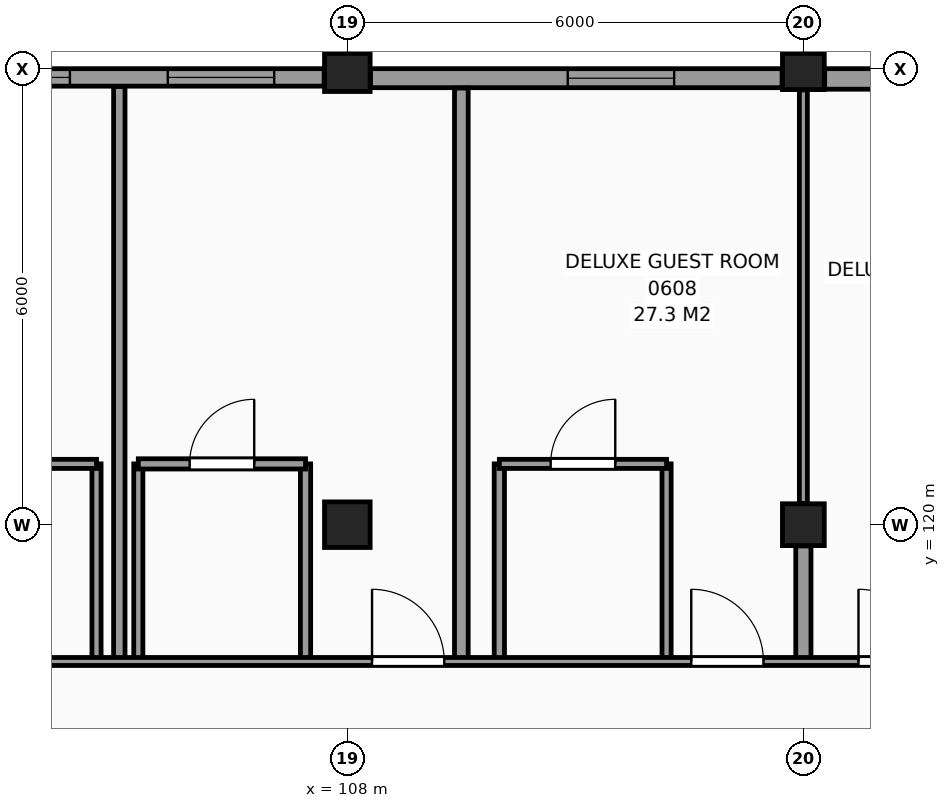
"""IFC4 building model, lengths in metres.
Left out: names, types, materials, properties, quantities, classifications, styles, units other than length and angle.
Written with IfcOpenShell. Run it as: python <this file> out.ifc"""

import sys

from ifc_helpers import new_model, si_unit, direction, frame, frame_2d, origin, origin_2d, place, context, subcontext, project, spatial, rectangle, extrude, element, fill, save


model = new_model("IFC4")
c1 = context("Model", 3, precision=1e-05, world=origin(), true_north=direction((0.0, 1.0)))
c2 = subcontext(c1, "Body", "Model", "MODEL_VIEW")
j1 = project(units=[si_unit("LENGTHUNIT", "METRE"), si_unit("PLANEANGLEUNIT", "RADIAN")], contexts=[c1])
p1 = place(None, origin())
s1 = spatial("IfcSite", under=j1, at=p1, CompositionType="ELEMENT")
p2 = place(p1, origin())
s2 = spatial("IfcBuilding", under=s1, at=p2, CompositionType="ELEMENT")
p3 = place(p2, frame((0.0, 0.0, 28.2)))
s3 = spatial("IfcBuildingStorey", under=s2, at=p3, CompositionType="ELEMENT", Elevation=28.2)
for number, where, z_axis, x_axis in (
    (1, (108.0, 120.0, 0.0), (0.0, 0.0, 1.0), (1.0, 0.0, 0.0)),
    (2, (108.0, 126.0, 0.0), (0.0, 0.0, 1.0), (1.0, 0.0, 0.0)),
):
    element("IfcColumn", number, at=place(p3, frame(where, z_axis=z_axis, x_axis=x_axis)), inside=s3, PredefinedType="COLUMN", context=c2, shape_type="SweptSolid", body=[
        extrude(rectangle(XDim=0.6, YDim=0.6, at=origin_2d()), origin(), (0.0, 0.0, 1.0), 3.3),
    ])
for number, where, z_axis, x_axis in (
    (3, (114.0, 120.0, 0.0), (0.0, 0.0, 1.0), (1.0, 0.0, 0.0)),
    (4, (114.0, 126.0, 0.0), (0.0, 0.0, 1.0), (1.0, 0.0, 0.0)),
):
    element("IfcColumn", number, at=place(p3, frame(where, z_axis=z_axis, x_axis=x_axis)), inside=s3, PredefinedType="COLUMN", context=c2, shape_type="SweptSolid", body=[
        extrude(rectangle(XDim=0.55, YDim=0.55, at=origin_2d()), origin(), (0.0, 0.0, 1.0), 3.3),
    ])
p4 = place(p3, frame((119.695, 125.865, 0.0), z_axis=(0.0, 0.0, 1.0), x_axis=(-1.0, 0.0, 0.0)))
e5 = element("IfcWall", 5, at=p4, inside=s3, PredefinedType="SOLIDWALL", context=c2, shape_type="SweptSolid", body=[
    extrude(rectangle(XDim=5.415, YDim=0.27, at=frame_2d((2.708, 0.0))), origin(), (0.0, 0.0, 1.0), 2.43),
])
p5 = place(p4, frame((2.595, 0.0, 0.8)))
e6 = element("IfcOpeningElement", 6, at=p5, cuts=e5, PredefinedType="OPENING", context=c2, shape_type="SweptSolid", body=[
    extrude(rectangle(XDim=1.4, YDim=1.4, at=frame_2d((0.7, 0.7))), frame((0.0, 0.145, 0.0), z_axis=(0.0, -1.0, 0.0), x_axis=(1.0, 0.0, 0.0)), (0.0, 0.0, 1.0), 0.29),
])
p6 = place(p3, frame((113.72, 125.875, 0.0), z_axis=(0.0, 0.0, 1.0), x_axis=(-1.0, 0.0, 0.0)))
e7 = element("IfcWall", 7, at=p6, inside=s3, PredefinedType="SOLIDWALL", context=c2, shape_type="SweptSolid", body=[
    extrude(rectangle(XDim=5.415, YDim=0.25, at=frame_2d((2.708, 0.0))), origin(), (0.0, 0.0, 1.0), 2.43),
])
p7 = place(p6, frame((1.42, 0.0, 0.8)))
e8 = element("IfcOpeningElement", 8, at=p7, cuts=e7, PredefinedType="OPENING", context=c2, shape_type="SweptSolid", body=[
    extrude(rectangle(XDim=1.4, YDim=1.4, at=frame_2d((0.7, 0.7))), frame((0.0, 0.135, 0.0), z_axis=(0.0, -1.0, 0.0), x_axis=(1.0, 0.0, 0.0)), (0.0, 0.0, 1.0), 0.27),
])
p8 = place(p3, frame((107.695, 125.885, 0.0), z_axis=(0.0, 0.0, 1.0), x_axis=(-1.0, 0.0, 0.0)))
e9 = element("IfcWall", 9, at=p8, inside=s3, PredefinedType="SOLIDWALL", context=c2, shape_type="SweptSolid", body=[
    extrude(rectangle(XDim=5.415, YDim=0.23, at=frame_2d((2.708, 0.0))), origin(), (0.0, 0.0, 1.0), 2.43),
])
p9 = place(p8, frame((3.345, 0.0, 0.8)))
e10 = element("IfcOpeningElement", 10, at=p9, cuts=e9, PredefinedType="OPENING", context=c2, shape_type="SweptSolid", body=[
    extrude(rectangle(XDim=1.4, YDim=1.4, at=frame_2d((0.7, 0.7))), frame((0.0, 0.125, 0.0), z_axis=(0.0, -1.0, 0.0), x_axis=(1.0, 0.0, 0.0)), (0.0, 0.0, 1.0), 0.25),
])
p10 = place(p8, frame((0.657, 0.0, 0.8)))
e11 = element("IfcOpeningElement", 11, at=p10, cuts=e9, PredefinedType="OPENING", context=c2, shape_type="SweptSolid", body=[
    extrude(rectangle(XDim=1.4, YDim=1.4, at=frame_2d((0.7, 0.7))), frame((0.0, 0.125, 0.0), z_axis=(0.0, -1.0, 0.0), x_axis=(1.0, 0.0, 0.0)), (0.0, 0.0, 1.0), 0.25),
])
p11 = place(p3, frame((104.7, 118.2, 0.0), z_axis=(0.0, 0.0, 1.0), x_axis=(0.0, 1.0, 0.0)))
e12 = element("IfcWall", 12, at=p11, inside=s3, PredefinedType="PARTITIONING", context=c2, shape_type="SweptSolid", body=[
    extrude(rectangle(XDim=2.6, YDim=0.12, at=frame_2d((1.3, 0.0))), origin(), (0.0, 0.0, 1.0), 3.08),
])
p12 = place(p3, frame((105.0, 118.2, 0.0), z_axis=(0.0, 0.0, 1.0), x_axis=(0.0, 1.0, 0.0)))
e13 = element("IfcWall", 13, at=p12, inside=s3, PredefinedType="PARTITIONING", context=c2, shape_type="SweptSolid", body=[
    extrude(rectangle(XDim=7.565, YDim=0.15, at=frame_2d((3.782, 0.0))), origin(), (0.0, 0.0, 1.0), 3.08),
])
p13 = place(p3, frame((105.25, 118.2, 0.0), z_axis=(0.0, 0.0, 1.0), x_axis=(0.0, 1.0, 0.0)))
e14 = element("IfcWall", 14, at=p13, inside=s3, PredefinedType="PARTITIONING", context=c2, shape_type="SweptSolid", body=[
    extrude(rectangle(XDim=2.6, YDim=0.12, at=frame_2d((1.3, 0.0))), origin(), (0.0, 0.0, 1.0), 3.08),
])
p14 = place(p3, frame((107.45, 118.2, 0.0), z_axis=(0.0, 0.0, 1.0), x_axis=(0.0, 1.0, 0.0)))
e15 = element("IfcWall", 15, at=p14, inside=s3, PredefinedType="PARTITIONING", context=c2, shape_type="SweptSolid", body=[
    extrude(rectangle(XDim=2.6, YDim=0.135, at=frame_2d((1.3, 0.0))), origin(), (0.0, 0.0, 1.0), 3.08),
])
p15 = place(p3, frame((109.5, 118.2, 0.0), z_axis=(0.0, 0.0, 1.0), x_axis=(0.0, 1.0, 0.0)))
e16 = element("IfcWall", 16, at=p15, inside=s3, PredefinedType="PARTITIONING", context=c2, shape_type="SweptSolid", body=[
    extrude(rectangle(XDim=7.545, YDim=0.18, at=frame_2d((3.772, 0.0))), origin(), (0.0, 0.0, 1.0), 3.08),
])
p16 = place(p3, frame((110.0, 118.2, 0.0), z_axis=(0.0, 0.0, 1.0), x_axis=(0.0, 1.0, 0.0)))
e17 = element("IfcWall", 17, at=p16, inside=s3, PredefinedType="PARTITIONING", context=c2, shape_type="SweptSolid", body=[
    extrude(rectangle(XDim=2.6, YDim=0.135, at=frame_2d((1.3, 0.0))), origin(), (0.0, 0.0, 1.0), 3.08),
])
p17 = place(p3, frame((112.2, 118.2, 0.0), z_axis=(0.0, 0.0, 1.0), x_axis=(0.0, 1.0, 0.0)))
e18 = element("IfcWall", 18, at=p17, inside=s3, PredefinedType="PARTITIONING", context=c2, shape_type="SweptSolid", body=[
    extrude(rectangle(XDim=2.6, YDim=0.12, at=frame_2d((1.3, 0.0))), origin(), (0.0, 0.0, 1.0), 3.08),
])
p18 = place(p3, frame((114.0, 118.2, 0.0), z_axis=(0.0, 0.0, 1.0), x_axis=(0.0, 1.0, 0.0)))
e19 = element("IfcWall", 19, at=p18, inside=s3, PredefinedType="PARTITIONING", context=c2, shape_type="SweptSolid", body=[
    extrude(rectangle(XDim=1.52, YDim=0.2, at=frame_2d((0.76, 0.0))), origin(), (0.0, 0.0, 1.0), 2.38),
])
p19 = place(p3, frame((114.0, 120.28, 0.0), z_axis=(0.0, 0.0, 1.0), x_axis=(0.0, 1.0, 0.0)))
e20 = element("IfcWall", 20, at=p19, inside=s3, PredefinedType="PARTITIONING", context=c2, shape_type="SweptSolid", body=[
    extrude(rectangle(XDim=5.44, YDim=0.105, at=frame_2d((2.72, 0.0))), origin(), (0.0, 0.0, 1.0), 2.53),
])
p20 = place(p3, frame((66.235, 118.2, 0.0), z_axis=(0.0, 0.0, 1.0), x_axis=(1.0, 0.0, 0.0)))
e21 = element("IfcWall", 21, at=p20, inside=s3, PredefinedType="PARTITIONING", context=c2, shape_type="SweptSolid", body=[
    extrude(rectangle(XDim=110.265, YDim=0.105, at=frame_2d((55.132, 0.0))), origin(), (0.0, 0.0, 1.0), 3.08),
])
p21 = place(p20, frame((0.49, 0.0, 0.0)))
e22 = element("IfcOpeningElement", 22, at=p21, cuts=e21, PredefinedType="OPENING", context=c2, shape_type="SweptSolid", body=[
    extrude(rectangle(XDim=0.95, YDim=2.1, at=frame_2d((0.475, 1.05))), frame((0.0, 0.062, 0.0), z_axis=(0.0, -1.0, 0.0), x_axis=(1.0, 0.0, 0.0)), (0.0, 0.0, 1.0), 0.125),
])
p22 = place(p20, frame((4.89, 0.0, 0.0)))
e23 = element("IfcOpeningElement", 23, at=p22, cuts=e21, PredefinedType="OPENING", context=c2, shape_type="SweptSolid", body=[
    extrude(rectangle(XDim=0.95, YDim=2.1, at=frame_2d((0.475, 1.05))), frame((0.0, 0.062, 0.0), z_axis=(0.0, -1.0, 0.0), x_axis=(1.0, 0.0, 0.0)), (0.0, 0.0, 1.0), 0.125),
])
p23 = place(p20, frame((9.39, 0.0, 0.0)))
e24 = element("IfcOpeningElement", 24, at=p23, cuts=e21, PredefinedType="OPENING", context=c2, shape_type="SweptSolid", body=[
    extrude(rectangle(XDim=0.95, YDim=2.1, at=frame_2d((0.475, 1.05))), frame((0.0, 0.062, 0.0), z_axis=(0.0, -1.0, 0.0), x_axis=(1.0, 0.0, 0.0)), (0.0, 0.0, 1.0), 0.125),
])
p24 = place(p20, frame((24.09, 0.0, 0.0)))
e25 = element("IfcOpeningElement", 25, at=p24, cuts=e21, PredefinedType="OPENING", context=c2, shape_type="SweptSolid", body=[
    extrude(rectangle(XDim=0.95, YDim=2.1, at=frame_2d((0.475, 1.05))), frame((0.0, 0.062, 0.0), z_axis=(0.0, -1.0, 0.0), x_axis=(1.0, 0.0, 0.0)), (0.0, 0.0, 1.0), 0.125),
])
p25 = place(p20, frame((32.34, 0.0, 0.0)))
e26 = element("IfcOpeningElement", 26, at=p25, cuts=e21, PredefinedType="OPENING", context=c2, shape_type="SweptSolid", body=[
    extrude(rectangle(XDim=0.95, YDim=2.1, at=frame_2d((0.475, 1.05))), frame((0.0, 0.062, 0.0), z_axis=(0.0, -1.0, 0.0), x_axis=(1.0, 0.0, 0.0)), (0.0, 0.0, 1.0), 0.125),
])
p26 = place(p20, frame((34.89, 0.0, 0.0)))
e27 = element("IfcOpeningElement", 27, at=p26, cuts=e21, PredefinedType="OPENING", context=c2, shape_type="SweptSolid", body=[
    extrude(rectangle(XDim=0.95, YDim=2.1, at=frame_2d((0.475, 1.05))), frame((0.0, 0.062, 0.0), z_axis=(0.0, -1.0, 0.0), x_axis=(1.0, 0.0, 0.0)), (0.0, 0.0, 1.0), 0.125),
])
p27 = place(p20, frame((42.09, 0.0, 0.0)))
e28 = element("IfcOpeningElement", 28, at=p27, cuts=e21, PredefinedType="OPENING", context=c2, shape_type="SweptSolid", body=[
    extrude(rectangle(XDim=0.95, YDim=2.1, at=frame_2d((0.475, 1.05))), frame((0.0, 0.062, 0.0), z_axis=(0.0, -1.0, 0.0), x_axis=(1.0, 0.0, 0.0)), (0.0, 0.0, 1.0), 0.125),
])
p28 = place(p20, frame((46.29, 0.0, 0.0)))
e29 = element("IfcOpeningElement", 29, at=p28, cuts=e21, PredefinedType="OPENING", context=c2, shape_type="SweptSolid", body=[
    extrude(rectangle(XDim=0.95, YDim=2.1, at=frame_2d((0.475, 1.05))), frame((0.0, 0.062, 0.0), z_axis=(0.0, -1.0, 0.0), x_axis=(1.0, 0.0, 0.0)), (0.0, 0.0, 1.0), 0.125),
])
p29 = place(p20, frame((48.49, 0.0, 0.0)))
e30 = element("IfcOpeningElement", 30, at=p29, cuts=e21, PredefinedType="OPENING", context=c2, shape_type="SweptSolid", body=[
    extrude(rectangle(XDim=0.95, YDim=2.1, at=frame_2d((0.475, 1.05))), frame((0.0, 0.062, 0.0), z_axis=(0.0, -1.0, 0.0), x_axis=(1.0, 0.0, 0.0)), (0.0, 0.0, 1.0), 0.125),
])
p30 = place(p20, frame((54.49, 0.0, 0.0)))
e31 = element("IfcOpeningElement", 31, at=p30, cuts=e21, PredefinedType="OPENING", context=c2, shape_type="SweptSolid", body=[
    extrude(rectangle(XDim=0.95, YDim=2.1, at=frame_2d((0.475, 1.05))), frame((0.0, 0.062, 0.0), z_axis=(0.0, -1.0, 0.0), x_axis=(1.0, 0.0, 0.0)), (0.0, 0.0, 1.0), 0.125),
])
p31 = place(p20, frame((64.29, 0.0, 0.0)))
e32 = element("IfcOpeningElement", 32, at=p31, cuts=e21, PredefinedType="OPENING", context=c2, shape_type="SweptSolid", body=[
    extrude(rectangle(XDim=0.95, YDim=2.1, at=frame_2d((0.475, 1.05))), frame((0.0, 0.062, 0.0), z_axis=(0.0, -1.0, 0.0), x_axis=(1.0, 0.0, 0.0)), (0.0, 0.0, 1.0), 0.125),
])
p32 = place(p20, frame((66.49, 0.0, 0.0)))
e33 = element("IfcOpeningElement", 33, at=p32, cuts=e21, PredefinedType="OPENING", context=c2, shape_type="SweptSolid", body=[
    extrude(rectangle(XDim=0.95, YDim=2.1, at=frame_2d((0.475, 1.05))), frame((0.0, 0.062, 0.0), z_axis=(0.0, -1.0, 0.0), x_axis=(1.0, 0.0, 0.0)), (0.0, 0.0, 1.0), 0.125),
])
p33 = place(p20, frame((70.89, 0.0, 0.0)))
e34 = element("IfcOpeningElement", 34, at=p33, cuts=e21, PredefinedType="OPENING", context=c2, shape_type="SweptSolid", body=[
    extrude(rectangle(XDim=0.95, YDim=2.1, at=frame_2d((0.475, 1.05))), frame((0.0, 0.062, 0.0), z_axis=(0.0, -1.0, 0.0), x_axis=(1.0, 0.0, 0.0)), (0.0, 0.0, 1.0), 0.125),
])
p34 = place(p20, frame((78.09, 0.0, 0.0)))
e35 = element("IfcOpeningElement", 35, at=p34, cuts=e21, PredefinedType="OPENING", context=c2, shape_type="SweptSolid", body=[
    extrude(rectangle(XDim=0.95, YDim=2.1, at=frame_2d((0.475, 1.05))), frame((0.0, 0.062, 0.0), z_axis=(0.0, -1.0, 0.0), x_axis=(1.0, 0.0, 0.0)), (0.0, 0.0, 1.0), 0.125),
])
p35 = place(p20, frame((86.34, 0.0, 0.0)))
e36 = element("IfcOpeningElement", 36, at=p35, cuts=e21, PredefinedType="OPENING", context=c2, shape_type="SweptSolid", body=[
    extrude(rectangle(XDim=0.95, YDim=2.1, at=frame_2d((0.475, 1.05))), frame((0.0, 0.062, 0.0), z_axis=(0.0, -1.0, 0.0), x_axis=(1.0, 0.0, 0.0)), (0.0, 0.0, 1.0), 0.125),
])
p36 = place(p20, frame((88.89, 0.0, 0.0)))
e37 = element("IfcOpeningElement", 37, at=p36, cuts=e21, PredefinedType="OPENING", context=c2, shape_type="SweptSolid", body=[
    extrude(rectangle(XDim=0.95, YDim=2.1, at=frame_2d((0.475, 1.05))), frame((0.0, 0.062, 0.0), z_axis=(0.0, -1.0, 0.0), x_axis=(1.0, 0.0, 0.0)), (0.0, 0.0, 1.0), 0.125),
])
p37 = place(p20, frame((93.39, 0.0, 0.0)))
e38 = element("IfcOpeningElement", 38, at=p37, cuts=e21, PredefinedType="OPENING", context=c2, shape_type="SweptSolid", body=[
    extrude(rectangle(XDim=0.95, YDim=2.1, at=frame_2d((0.475, 1.05))), frame((0.0, 0.062, 0.0), z_axis=(0.0, -1.0, 0.0), x_axis=(1.0, 0.0, 0.0)), (0.0, 0.0, 1.0), 0.125),
])
p38 = place(p20, frame((104.99, 0.0, 0.0)))
e39 = element("IfcOpeningElement", 39, at=p38, cuts=e21, PredefinedType="OPENING", context=c2, shape_type="SweptSolid", body=[
    extrude(rectangle(XDim=0.95, YDim=2.1, at=frame_2d((0.475, 1.05))), frame((0.0, 0.062, 0.0), z_axis=(0.0, -1.0, 0.0), x_axis=(1.0, 0.0, 0.0)), (0.0, 0.0, 1.0), 0.125),
])
p39 = place(p3, frame((102.5, 120.8, 0.0), z_axis=(0.0, 0.0, 1.0), x_axis=(1.0, 0.0, 0.0)))
e40 = element("IfcWall", 40, at=p39, inside=s3, PredefinedType="PARTITIONING", context=c2, shape_type="SweptSolid", body=[
    extrude(rectangle(XDim=2.2, YDim=0.12, at=frame_2d((1.1, 0.0))), origin(), (0.0, 0.0, 1.0), 3.08),
])
p40 = place(p39, frame((0.675, 0.0, 0.0)))
e41 = element("IfcOpeningElement", 41, at=p40, cuts=e40, PredefinedType="OPENING", context=c2, shape_type="SweptSolid", body=[
    extrude(rectangle(XDim=0.85, YDim=2.1, at=frame_2d((0.425, 1.05))), frame((0.0, 0.07, 0.0), z_axis=(0.0, -1.0, 0.0), x_axis=(1.0, 0.0, 0.0)), (0.0, 0.0, 1.0), 0.14),
])
p41 = place(p3, frame((105.25, 120.8, 0.0), z_axis=(0.0, 0.0, 1.0), x_axis=(1.0, 0.0, 0.0)))
e42 = element("IfcWall", 42, at=p41, inside=s3, PredefinedType="PARTITIONING", context=c2, shape_type="SweptSolid", body=[
    extrude(rectangle(XDim=2.2, YDim=0.135, at=frame_2d((1.1, 0.0))), origin(), (0.0, 0.0, 1.0), 3.08),
])
p42 = place(p41, frame((0.675, 0.0, 0.0)))
e43 = element("IfcOpeningElement", 43, at=p42, cuts=e42, PredefinedType="OPENING", context=c2, shape_type="SweptSolid", body=[
    extrude(rectangle(XDim=0.85, YDim=2.1, at=frame_2d((0.425, 1.05))), frame((0.0, 0.078, 0.0), z_axis=(0.0, -1.0, 0.0), x_axis=(1.0, 0.0, 0.0)), (0.0, 0.0, 1.0), 0.155),
])
p43 = place(p3, frame((110.0, 120.8, 0.0), z_axis=(0.0, 0.0, 1.0), x_axis=(1.0, 0.0, 0.0)))
e44 = element("IfcWall", 44, at=p43, inside=s3, PredefinedType="PARTITIONING", context=c2, shape_type="SweptSolid", body=[
    extrude(rectangle(XDim=2.2, YDim=0.12, at=frame_2d((1.1, 0.0))), origin(), (0.0, 0.0, 1.0), 3.08),
])
p44 = place(p43, frame((0.675, 0.0, 0.0)))
e45 = element("IfcOpeningElement", 45, at=p44, cuts=e44, PredefinedType="OPENING", context=c2, shape_type="SweptSolid", body=[
    extrude(rectangle(XDim=0.85, YDim=2.1, at=frame_2d((0.425, 1.05))), frame((0.0, 0.07, 0.0), z_axis=(0.0, -1.0, 0.0), x_axis=(1.0, 0.0, 0.0)), (0.0, 0.0, 1.0), 0.14),
])
p45 = place(p9, origin())
e46 = element("IfcWindow", 46, at=p45, inside=s3, PartitioningType="SINGLE_PANEL", PredefinedType="WINDOW", context=c2, shape_type="SweptSolid", body=[
    extrude(rectangle(XDim=1.4, YDim=1.4, at=frame_2d((0.7, 0.7))), frame((0.0, 0.03, 0.0), z_axis=(0.0, -1.0, 0.0), x_axis=(1.0, 0.0, 0.0)), (0.0, 0.0, 1.0), 0.06),
])
fill(e10, e46)
p46 = place(p10, origin())
e47 = element("IfcWindow", 47, at=p46, inside=s3, PartitioningType="SINGLE_PANEL", PredefinedType="WINDOW", context=c2, shape_type="SweptSolid", body=[
    extrude(rectangle(XDim=1.4, YDim=1.4, at=frame_2d((0.7, 0.7))), frame((0.0, 0.03, 0.0), z_axis=(0.0, -1.0, 0.0), x_axis=(1.0, 0.0, 0.0)), (0.0, 0.0, 1.0), 0.06),
])
fill(e11, e47)
p47 = place(p7, origin())
e48 = element("IfcWindow", 48, at=p47, inside=s3, PartitioningType="SINGLE_PANEL", PredefinedType="WINDOW", context=c2, shape_type="SweptSolid", body=[
    extrude(rectangle(XDim=1.4, YDim=1.4, at=frame_2d((0.7, 0.7))), frame((0.0, 0.03, 0.0), z_axis=(0.0, -1.0, 0.0), x_axis=(1.0, 0.0, 0.0)), (0.0, 0.0, 1.0), 0.06),
])
fill(e8, e48)
p48 = place(p42, origin())
e49 = element("IfcDoor", 49, at=p48, inside=s3, OperationType="SINGLE_SWING_RIGHT", PredefinedType="DOOR", context=c2, shape_type="SweptSolid", body=[
    extrude(rectangle(XDim=0.85, YDim=2.1, at=frame_2d((0.425, 1.05))), frame((0.0, 0.025, 0.0), z_axis=(0.0, -1.0, 0.0), x_axis=(1.0, 0.0, 0.0)), (0.0, 0.0, 1.0), 0.05),
])
fill(e43, e49)
p49 = place(p27, origin())
e50 = element("IfcDoor", 50, at=p49, inside=s3, OperationType="SINGLE_SWING_LEFT", PredefinedType="DOOR", context=c2, shape_type="SweptSolid", body=[
    extrude(rectangle(XDim=0.95, YDim=2.1, at=frame_2d((0.475, 1.05))), frame((0.0, 0.025, 0.0), z_axis=(0.0, -1.0, 0.0), x_axis=(1.0, 0.0, 0.0)), (0.0, 0.0, 1.0), 0.05),
])
fill(e28, e50)
p50 = place(p44, origin())
e51 = element("IfcDoor", 51, at=p50, inside=s3, OperationType="SINGLE_SWING_RIGHT", PredefinedType="DOOR", context=c2, shape_type="SweptSolid", body=[
    extrude(rectangle(XDim=0.85, YDim=2.1, at=frame_2d((0.425, 1.05))), frame((0.0, 0.025, 0.0), z_axis=(0.0, -1.0, 0.0), x_axis=(1.0, 0.0, 0.0)), (0.0, 0.0, 1.0), 0.05),
])
fill(e45, e51)
p51 = place(p28, origin())
e52 = element("IfcDoor", 52, at=p51, inside=s3, OperationType="SINGLE_SWING_LEFT", PredefinedType="DOOR", context=c2, shape_type="SweptSolid", body=[
    extrude(rectangle(XDim=0.95, YDim=2.1, at=frame_2d((0.475, 1.05))), frame((0.0, 0.025, 0.0), z_axis=(0.0, -1.0, 0.0), x_axis=(1.0, 0.0, 0.0)), (0.0, 0.0, 1.0), 0.05),
])
fill(e29, e52)
p52 = place(p29, origin())
e53 = element("IfcDoor", 53, at=p52, inside=s3, OperationType="SINGLE_SWING_LEFT", PredefinedType="DOOR", context=c2, shape_type="SweptSolid", body=[
    extrude(rectangle(XDim=0.95, YDim=2.1, at=frame_2d((0.475, 1.05))), frame((0.0, 0.025, 0.0), z_axis=(0.0, -1.0, 0.0), x_axis=(1.0, 0.0, 0.0)), (0.0, 0.0, 1.0), 0.05),
])
fill(e30, e53)
save(model, sys.argv[1])
